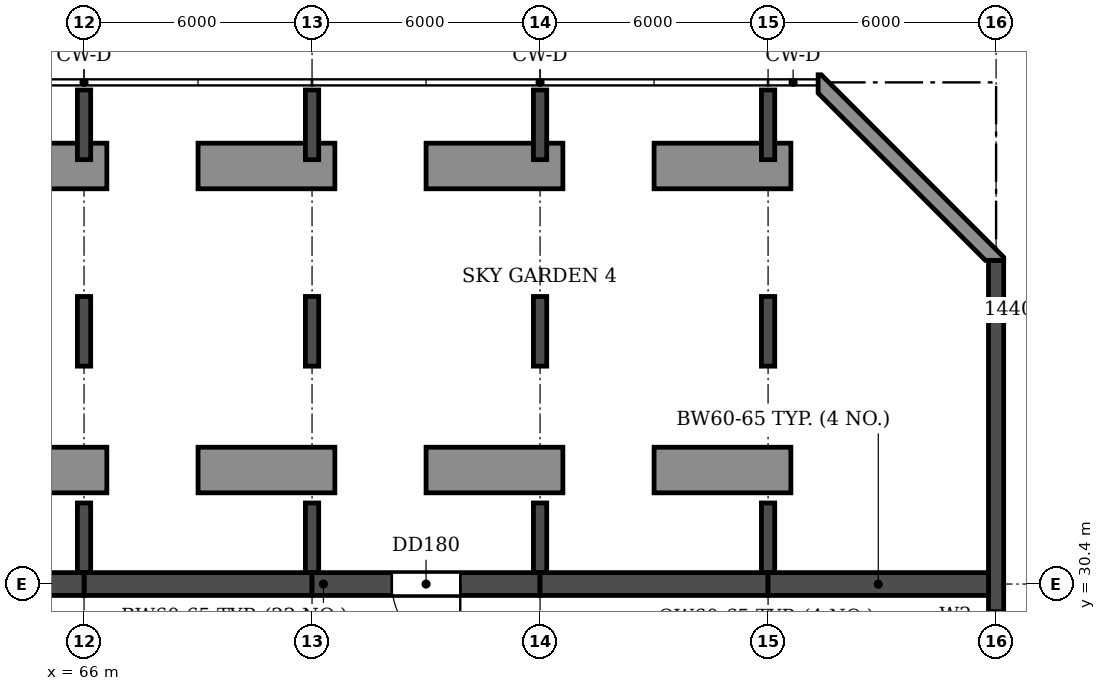
"""IFC4 building model, lengths in metres.
Left out: names, types, materials, properties, quantities, classifications, styles, units other than length and angle.
Written with IfcOpenShell. Run it as: python <this file> out.ifc"""

import sys

from ifc_helpers import new_model, si_unit, direction, frame, frame_2d, origin, place, context, subcontext, project, spatial, polyline, rectangle, outline, extrude, source, transform, mapped, element, fill, save


model = new_model("IFC4")
c1 = context("Model", 3, precision=1e-05, world=origin(), true_north=direction((0.0, 1.0)))
c2 = subcontext(c1, "Body", "Model", "MODEL_VIEW")
j1 = project(units=[si_unit("LENGTHUNIT", "METRE"), si_unit("PLANEANGLEUNIT", "RADIAN")], contexts=[c1])
p1 = place(None, origin())
s1 = spatial("IfcSite", under=j1, at=p1, CompositionType="ELEMENT")
p2 = place(p1, origin())
s2 = spatial("IfcBuilding", under=s1, at=p2, CompositionType="ELEMENT")
p3 = place(p2, frame((0.0, 0.0, 115.8)))
s3 = spatial("IfcBuildingStorey", under=s2, at=p3, CompositionType="ELEMENT", Elevation=115.8)
p4 = place(p3, frame((66.0, 30.7, 0.0), z_axis=(0.0, 0.0, 1.0), x_axis=(0.0, 1.0, 0.0)))
e1 = element("IfcWall", 1, at=p4, inside=s3, PredefinedType="SHEAR", context=c2, shape_type="SweptSolid", body=[
    extrude(rectangle(XDim=1.833, YDim=0.35, at=frame_2d((0.917, 0.0))), origin(), (0.0, 0.0, 1.0), 6.37),
])
p5 = place(p3, frame((66.0, 36.133, 0.0), z_axis=(0.0, 0.0, 1.0), x_axis=(0.0, 1.0, 0.0)))
e2 = element("IfcWall", 2, at=p5, inside=s3, PredefinedType="SHEAR", context=c2, shape_type="SweptSolid", body=[
    extrude(rectangle(XDim=1.833, YDim=0.35, at=frame_2d((0.917, 0.0))), origin(), (0.0, 0.0, 1.0), 6.37),
])
for number, where, z_axis, x_axis in (
    (3, (66.0, 41.567, 0.0), (0.0, 0.0, 1.0), (0.0, 1.0, 0.0)),
    (4, (72.0, 30.7, 0.0), (0.0, 0.0, 1.0), (0.0, 1.0, 0.0)),
):
    element("IfcWall", number, at=place(p3, frame(where, z_axis=z_axis, x_axis=x_axis)), inside=s3, PredefinedType="SHEAR", context=c2, shape_type="SweptSolid", body=[
        extrude(rectangle(XDim=1.833, YDim=0.35, at=frame_2d((0.917, 0.0))), origin(), (0.0, 0.0, 1.0), 6.37),
    ])
p6 = place(p3, frame((72.0, 36.133, 0.0), z_axis=(0.0, 0.0, 1.0), x_axis=(0.0, 1.0, 0.0)))
e5 = element("IfcWall", 5, at=p6, inside=s3, PredefinedType="SHEAR", context=c2, shape_type="SweptSolid", body=[
    extrude(rectangle(XDim=1.833, YDim=0.35, at=frame_2d((0.917, 0.0))), origin(), (0.0, 0.0, 1.0), 6.37),
])
for number, where, z_axis, x_axis in (
    (6, (72.0, 41.567, 0.0), (0.0, 0.0, 1.0), (0.0, 1.0, 0.0)),
    (7, (78.0, 30.7, 0.0), (0.0, 0.0, 1.0), (0.0, 1.0, 0.0)),
):
    element("IfcWall", number, at=place(p3, frame(where, z_axis=z_axis, x_axis=x_axis)), inside=s3, PredefinedType="SHEAR", context=c2, shape_type="SweptSolid", body=[
        extrude(rectangle(XDim=1.833, YDim=0.35, at=frame_2d((0.917, 0.0))), origin(), (0.0, 0.0, 1.0), 6.37),
    ])
p7 = place(p3, frame((78.0, 36.133, 0.0), z_axis=(0.0, 0.0, 1.0), x_axis=(0.0, 1.0, 0.0)))
e8 = element("IfcWall", 8, at=p7, inside=s3, PredefinedType="SHEAR", context=c2, shape_type="SweptSolid", body=[
    extrude(rectangle(XDim=1.833, YDim=0.35, at=frame_2d((0.917, 0.0))), origin(), (0.0, 0.0, 1.0), 6.37),
])
for number, where, z_axis, x_axis in (
    (9, (78.0, 41.567, 0.0), (0.0, 0.0, 1.0), (0.0, 1.0, 0.0)),
    (10, (84.0, 30.7, 0.0), (0.0, 0.0, 1.0), (0.0, 1.0, 0.0)),
):
    element("IfcWall", number, at=place(p3, frame(where, z_axis=z_axis, x_axis=x_axis)), inside=s3, PredefinedType="SHEAR", context=c2, shape_type="SweptSolid", body=[
        extrude(rectangle(XDim=1.833, YDim=0.35, at=frame_2d((0.917, 0.0))), origin(), (0.0, 0.0, 1.0), 6.37),
    ])
p8 = place(p3, frame((84.0, 36.133, 0.0), z_axis=(0.0, 0.0, 1.0), x_axis=(0.0, 1.0, 0.0)))
e11 = element("IfcWall", 11, at=p8, inside=s3, PredefinedType="SHEAR", context=c2, shape_type="SweptSolid", body=[
    extrude(rectangle(XDim=1.833, YDim=0.35, at=frame_2d((0.917, 0.0))), origin(), (0.0, 0.0, 1.0), 6.37),
])
p9 = place(p3, frame((84.0, 41.567, 0.0), z_axis=(0.0, 0.0, 1.0), x_axis=(0.0, 1.0, 0.0)))
e12 = element("IfcWall", 12, at=p9, inside=s3, PredefinedType="SHEAR", context=c2, shape_type="SweptSolid", body=[
    extrude(rectangle(XDim=1.833, YDim=0.35, at=frame_2d((0.917, 0.0))), origin(), (0.0, 0.0, 1.0), 6.37),
])
p10 = place(p3, frame((90.0, 4.683, 0.0), z_axis=(0.0, 0.0, 1.0), x_axis=(0.0, 1.0, 0.0)))
e13 = element("IfcWall", 13, at=p10, inside=s3, PredefinedType="SHEAR", context=c2, shape_type="SweptSolid", body=[
    extrude(rectangle(XDim=34.234, YDim=0.4, at=frame_2d((17.117, 0.0))), origin(), (0.0, 0.0, 1.0), 6.37),
])
p11 = place(p10, frame((23.817, 0.0, 0.9)))
e14 = element("IfcOpeningElement", 14, at=p11, cuts=e13, PredefinedType="OPENING", context=c2, shape_type="SweptSolid", body=[
    extrude(rectangle(XDim=1.2, YDim=1.5, at=frame_2d((0.6, 0.75))), frame((0.0, 0.21, 0.0), z_axis=(0.0, -1.0, 0.0), x_axis=(1.0, 0.0, 0.0)), (0.0, 0.0, 1.0), 0.42),
])
p12 = place(p10, frame((8.017, 0.0, 0.9)))
e15 = element("IfcOpeningElement", 15, at=p12, cuts=e13, PredefinedType="OPENING", context=c2, shape_type="SweptSolid", body=[
    extrude(rectangle(XDim=1.2, YDim=1.5, at=frame_2d((0.6, 0.75))), frame((0.0, 0.21, 0.0), z_axis=(0.0, -1.0, 0.0), x_axis=(1.0, 0.0, 0.0)), (0.0, 0.0, 1.0), 0.42),
])
p13 = place(p10, frame((13.317, 0.0, 0.9)))
e16 = element("IfcOpeningElement", 16, at=p13, cuts=e13, PredefinedType="OPENING", context=c2, shape_type="SweptSolid", body=[
    extrude(rectangle(XDim=1.2, YDim=1.5, at=frame_2d((0.6, 0.75))), frame((0.0, 0.21, 0.0), z_axis=(0.0, -1.0, 0.0), x_axis=(1.0, 0.0, 0.0)), (0.0, 0.0, 1.0), 0.42),
])
for number, where, z_axis, x_axis in (
    (17, (60.0, 30.4, 0.0), (0.0, 0.0, 1.0), (1.0, 0.0, 0.0)),
    (18, (66.0, 30.4, 0.0), (0.0, 0.0, 1.0), (1.0, 0.0, 0.0)),
):
    element("IfcWall", number, at=place(p3, frame(where, z_axis=z_axis, x_axis=x_axis)), inside=s3, PredefinedType="SHEAR", context=c2, shape_type="SweptSolid", body=[
        extrude(rectangle(XDim=6.0, YDim=0.6, at=frame_2d((3.0, 0.0))), origin(), (0.0, 0.0, 1.0), 6.37),
    ])
p14 = place(p3, frame((72.0, 30.4, 0.0), z_axis=(0.0, 0.0, 1.0), x_axis=(1.0, 0.0, 0.0)))
e19 = element("IfcWall", 19, at=p14, inside=s3, PredefinedType="SHEAR", context=c2, shape_type="SweptSolid", body=[
    extrude(rectangle(XDim=6.0, YDim=0.6, at=frame_2d((3.0, 0.0))), origin(), (0.0, 0.0, 1.0), 6.37),
])
p15 = place(p14, frame((2.1, 0.0, 0.0)))
e20 = element("IfcOpeningElement", 20, at=p15, cuts=e19, PredefinedType="OPENING", context=c2, shape_type="SweptSolid", body=[
    extrude(rectangle(XDim=1.8, YDim=2.1, at=frame_2d((0.9, 1.05))), frame((0.0, 0.31, 0.0), z_axis=(0.0, -1.0, 0.0), x_axis=(1.0, 0.0, 0.0)), (0.0, 0.0, 1.0), 0.62),
])
p16 = place(p3, frame((78.0, 30.4, 0.0), z_axis=(0.0, 0.0, 1.0), x_axis=(1.0, 0.0, 0.0)))
e21 = element("IfcWall", 21, at=p16, inside=s3, PredefinedType="SHEAR", context=c2, shape_type="SweptSolid", body=[
    extrude(rectangle(XDim=6.0, YDim=0.6, at=frame_2d((3.0, 0.0))), origin(), (0.0, 0.0, 1.0), 6.37),
])
p17 = place(p3, frame((84.0, 30.4, 0.0), z_axis=(0.0, 0.0, 1.0), x_axis=(1.0, 0.0, 0.0)))
e22 = element("IfcWall", 22, at=p17, inside=s3, PredefinedType="SHEAR", context=c2, shape_type="SweptSolid", body=[
    extrude(rectangle(XDim=5.8, YDim=0.6, at=frame_2d((2.9, 0.0))), origin(), (0.0, 0.0, 1.0), 6.37),
])
p18 = place(p3, origin())
e23 = element("IfcWall", 23, at=p18, inside=s3, PredefinedType="STANDARD", context=c2, shape_type="SweptSolid", body=[
    extrude(outline(polyline([(90.2, 38.917), (90.2, 39.0), (85.4, 43.8), (85.317, 43.8), (85.317, 43.317), (89.717, 38.917), (90.2, 38.917)])), origin(), (0.0, 0.0, 1.0), 6.37),
])
m1 = source(origin(), c2, "Body", "SweptSolid", [
    extrude(outline(polyline([(0.0, 0.0), (3.6, 0.0), (3.6, 1.2), (0.0, 1.2), (0.0, 0.0)])), origin(), (0.0, 0.0, 1.0), 0.6),
])
for number, where in (
    (24, (63.0, 32.8, 0.0)),
    (25, (69.0, 32.8, 0.0)),
    (26, (75.0, 32.8, 0.0)),
    (27, (81.0, 32.8, 0.0)),
    (28, (63.0, 40.8, 0.0)),
    (29, (69.0, 40.8, 0.0)),
    (30, (75.0, 40.8, 0.0)),
    (31, (81.0, 40.8, 0.0)),
):
    element("IfcWall", number, at=place(p3, frame(where)), inside=s3, PredefinedType="USERDEFINED", context=c2, shape_type="MappedRepresentation", body=[
        mapped(m1, transform((0.0, 0.0, 0.0))),
    ])
p19 = place(p11, origin())
e32 = element("IfcWindow", 32, at=p19, inside=s3, PartitioningType="SINGLE_PANEL", PredefinedType="WINDOW", context=c2, shape_type="SweptSolid", body=[
    extrude(rectangle(XDim=1.2, YDim=1.5, at=frame_2d((0.6, 0.75))), frame((0.0, 0.03, 0.0), z_axis=(0.0, -1.0, 0.0), x_axis=(1.0, 0.0, 0.0)), (0.0, 0.0, 1.0), 0.06),
])
fill(e14, e32)
p20 = place(p15, frame((1.8, 0.0, 0.0), z_axis=(0.0, 0.0, 1.0), x_axis=(-1.0, 0.0, 0.0)))
e33 = element("IfcDoor", 33, at=p20, inside=s3, OperationType="DOUBLE_DOOR_SINGLE_SWING", PredefinedType="DOOR", context=c2, shape_type="SweptSolid", body=[
    extrude(rectangle(XDim=1.8, YDim=2.1, at=frame_2d((0.9, 1.05))), frame((0.0, 0.025, 0.0), z_axis=(0.0, -1.0, 0.0), x_axis=(1.0, 0.0, 0.0)), (0.0, 0.0, 1.0), 0.05),
])
fill(e20, e33)
save(model, sys.argv[1])
